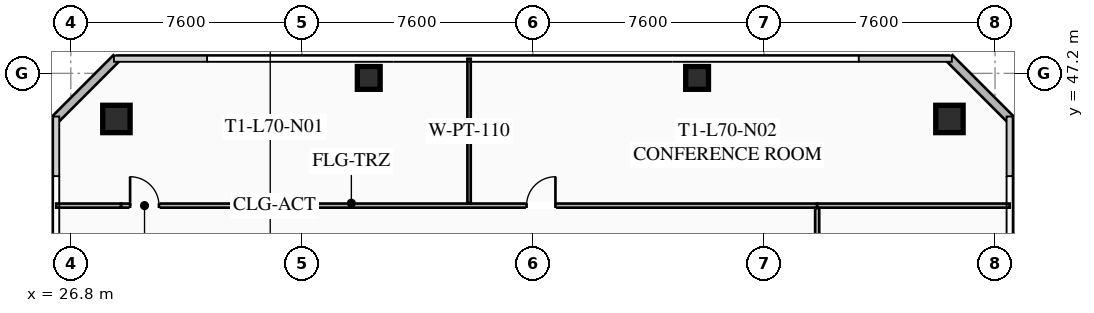
"""IFC4 building model, lengths in metres.
Left out: names, types, materials, properties, quantities, classifications, styles, units other than length and angle.
Written with IfcOpenShell. Run it as: python <this file> out.ifc"""

import sys

from ifc_helpers import new_model, si_unit, direction, frame, frame_2d, origin, origin_2d, place, context, subcontext, project, spatial, rectangle, hollow_rectangle, extrude, element, fill, save


model = new_model("IFC4")
c1 = context("Model", 3, precision=1e-05, world=origin(), true_north=direction((0.0, 1.0)))
c2 = subcontext(c1, "Body", "Model", "MODEL_VIEW")
j1 = project(units=[si_unit("LENGTHUNIT", "METRE"), si_unit("PLANEANGLEUNIT", "RADIAN")], contexts=[c1])
p1 = place(None, origin())
s1 = spatial("IfcSite", under=j1, at=p1, CompositionType="ELEMENT")
p2 = place(p1, origin())
s2 = spatial("IfcBuilding", under=s1, at=p2, CompositionType="ELEMENT")
p3 = place(p2, frame((0.0, 0.0, 259.4)))
s3 = spatial("IfcBuildingStorey", under=s2, at=p3, CompositionType="ELEMENT", Elevation=259.4)
for number, where, z_axis, x_axis in (
    (1, (55.7, 45.7, 0.0), (0.0, 0.0, 1.0), (1.0, 0.0, 0.0)),
    (2, (28.3, 45.7, 0.0), (0.0, 0.0, 1.0), (1.0, 0.0, 0.0)),
):
    element("IfcColumn", number, at=place(p3, frame(where, z_axis=z_axis, x_axis=x_axis)), inside=s3, PredefinedType="COLUMN", context=c2, shape_type="SweptSolid", body=[
        extrude(hollow_rectangle(XDim=0.9, YDim=0.9, WallThickness=0.04, at=origin_2d()), origin(), (0.0, 0.0, 1.0), 3.7),
    ])
for number, where, z_axis, x_axis in (
    (3, (47.4, 47.05, 0.0), (0.0, 0.0, 1.0), (1.0, 0.0, 0.0)),
    (4, (36.6, 47.05, 0.0), (0.0, 0.0, 1.0), (1.0, 0.0, 0.0)),
):
    element("IfcColumn", number, at=place(p3, frame(where, z_axis=z_axis, x_axis=x_axis)), inside=s3, PredefinedType="COLUMN", context=c2, shape_type="SweptSolid", body=[
        extrude(hollow_rectangle(XDim=0.75, YDim=0.75, WallThickness=0.032, at=origin_2d()), origin(), (0.0, 0.0, 1.0), 3.7),
    ])
for number, where, z_axis, x_axis in (
    (5, (26.3, 45.7, 0.0), (0.0, 0.0, 1.0), (0.707, 0.707, 0.0)),
    (6, (55.7, 47.7, 0.0), (0.0, 0.0, 1.0), (0.707, -0.707, 0.0)),
):
    element("IfcWall", number, at=place(p3, frame(where, z_axis=z_axis, x_axis=x_axis)), inside=s3, PredefinedType="SOLIDWALL", context=c2, shape_type="SweptSolid", body=[
        extrude(rectangle(XDim=2.828, YDim=0.28, at=frame_2d((1.414, 0.0))), origin(), (0.0, 0.0, 1.0), 3.7),
    ])
p4 = place(p3, frame((28.45, 42.85, 0.0), z_axis=(0.0, 0.0, 1.0), x_axis=(1.0, 0.0, 0.0)))
e7 = element("IfcWall", 7, at=p4, inside=s3, PredefinedType="PARTITIONING", context=c2, shape_type="SweptSolid", body=[
    extrude(rectangle(XDim=22.9, YDim=0.135, at=frame_2d((11.45, 0.0))), origin(), (0.0, 0.0, 1.0), 2.659),
])
p5 = place(p4, frame((0.3, 0.0, 0.0)))
e8 = element("IfcOpeningElement", 8, at=p5, cuts=e7, PredefinedType="OPENING", context=c2, shape_type="SweptSolid", body=[
    extrude(rectangle(XDim=0.95, YDim=2.05, at=frame_2d((0.475, 1.025))), frame((0.0, 0.077, 0.0), z_axis=(0.0, -1.0, 0.0), x_axis=(1.0, 0.0, 0.0)), (0.0, 0.0, 1.0), 0.155),
])
p6 = place(p4, frame((13.341, 0.0, 0.0)))
e9 = element("IfcOpeningElement", 9, at=p6, cuts=e7, PredefinedType="OPENING", context=c2, shape_type="SweptSolid", body=[
    extrude(rectangle(XDim=0.95, YDim=2.05, at=frame_2d((0.475, 1.025))), frame((0.0, 0.077, 0.0), z_axis=(0.0, -1.0, 0.0), x_axis=(1.0, 0.0, 0.0)), (0.0, 0.0, 1.0), 0.155),
])
p7 = place(p3, frame((26.32, 42.85, 0.0), z_axis=(0.0, 0.0, 1.0), x_axis=(1.0, 0.0, 0.0)))
e10 = element("IfcWall", 10, at=p7, inside=s3, PredefinedType="PARTITIONING", context=c2, shape_type="SweptSolid", body=[
    extrude(rectangle(XDim=2.13, YDim=0.135, at=frame_2d((1.065, 0.0))), origin(), (0.0, 0.0, 1.0), 2.659),
])
p8 = place(p3, frame((51.35, 42.85, 0.0), z_axis=(0.0, 0.0, 1.0), x_axis=(1.0, 0.0, 0.0)))
e11 = element("IfcWall", 11, at=p8, inside=s3, PredefinedType="PARTITIONING", context=c2, shape_type="SweptSolid", body=[
    extrude(rectangle(XDim=6.33, YDim=0.135, at=frame_2d((3.165, 0.0))), origin(), (0.0, 0.0, 1.0), 2.659),
])
p9 = place(p3, frame((39.9, 42.93, 0.0), z_axis=(0.0, 0.0, 1.0), x_axis=(0.0, 1.0, 0.0)))
e12 = element("IfcWall", 12, at=p9, inside=s3, PredefinedType="PARTITIONING", context=c2, shape_type="SweptSolid", body=[
    extrude(rectangle(XDim=4.75, YDim=0.11, at=frame_2d((2.375, 0.0))), origin(), (0.0, 0.0, 1.0), 2.659),
])
p10 = place(p3, frame((51.35, 42.77, 0.0), z_axis=(0.0, 0.0, 1.0), x_axis=(0.0, -1.0, 0.0)))
e13 = element("IfcWall", 13, at=p10, inside=s3, PredefinedType="PARTITIONING", context=c2, shape_type="SweptSolid", body=[
    extrude(rectangle(XDim=10.29, YDim=0.135, at=frame_2d((5.145, 0.0))), origin(), (0.0, 0.0, 1.0), 2.659),
])
p11 = place(p10, frame((2.1, 0.0, 0.0)))
e14 = element("IfcOpeningElement", 14, at=p11, cuts=e13, PredefinedType="OPENING", context=c2, shape_type="SweptSolid", body=[
    extrude(rectangle(XDim=0.95, YDim=2.05, at=frame_2d((0.475, 1.025))), frame((0.0, 0.077, 0.0), z_axis=(0.0, -1.0, 0.0), x_axis=(1.0, 0.0, 0.0)), (0.0, 0.0, 1.0), 0.155),
])
p12 = place(p5, origin())
e15 = element("IfcDoor", 15, at=p12, inside=s3, OperationType="SINGLE_SWING_LEFT", PredefinedType="DOOR", context=c2, shape_type="SweptSolid", body=[
    extrude(rectangle(XDim=0.95, YDim=2.05, at=frame_2d((0.475, 1.025))), frame((0.0, 0.025, 0.0), z_axis=(0.0, -1.0, 0.0), x_axis=(1.0, 0.0, 0.0)), (0.0, 0.0, 1.0), 0.05),
])
fill(e8, e15)
p13 = place(p6, origin())
e16 = element("IfcDoor", 16, at=p13, inside=s3, OperationType="SINGLE_SWING_RIGHT", PredefinedType="DOOR", context=c2, shape_type="SweptSolid", body=[
    extrude(rectangle(XDim=0.95, YDim=2.05, at=frame_2d((0.475, 1.025))), frame((0.0, 0.025, 0.0), z_axis=(0.0, -1.0, 0.0), x_axis=(1.0, 0.0, 0.0)), (0.0, 0.0, 1.0), 0.05),
])
fill(e9, e16)
save(model, sys.argv[1])
